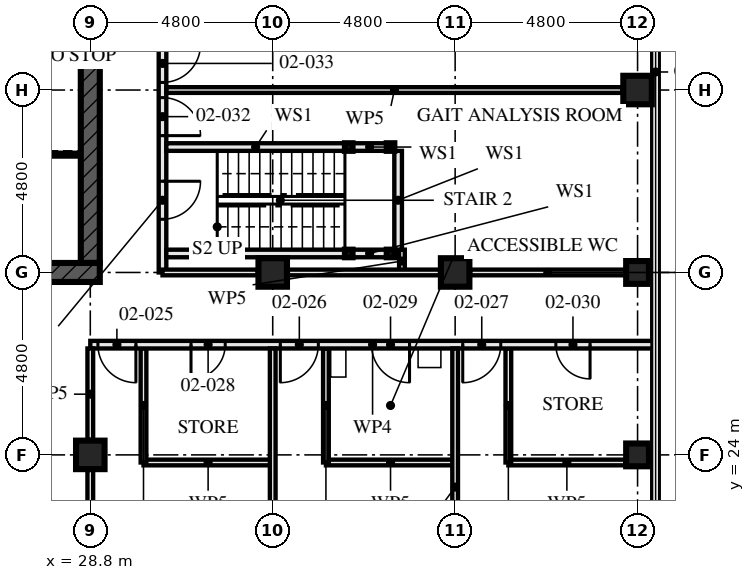
"""IFC4 building model, lengths in metres.
Left out: names, types, materials, properties, quantities, classifications, styles, units other than length and angle.
Written with IfcOpenShell. Run it as: python <this file> out.ifc"""

import sys

from ifc_helpers import new_model, si_unit, direction, frame, frame_2d, origin, origin_2d, place, context, subcontext, project, spatial, rectangle, hollow_rectangle, extrude, element, fill, save


model = new_model("IFC4")
c1 = context("Model", 3, precision=1e-05, world=origin(), true_north=direction((0.0, 1.0)))
c2 = subcontext(c1, "Body", "Model", "MODEL_VIEW")
j1 = project(units=[si_unit("LENGTHUNIT", "METRE"), si_unit("PLANEANGLEUNIT", "RADIAN")], contexts=[c1])
p1 = place(None, origin())
s1 = spatial("IfcSite", under=j1, at=p1, CompositionType="ELEMENT")
p2 = place(p1, origin())
s2 = spatial("IfcBuilding", under=s1, at=p2, CompositionType="ELEMENT")
p3 = place(p2, frame((0.0, 0.0, 9.0)))
s3 = spatial("IfcBuildingStorey", under=s2, at=p3, CompositionType="ELEMENT", Elevation=9.0)
for number, where, z_axis, x_axis in (
    (1, (28.8, 24.0, 0.0), (0.0, 0.0, 1.0), (1.0, 0.0, 0.0)),
    (2, (33.6, 28.8, 0.0), (0.0, 0.0, 1.0), (0.0, 1.0, 0.0)),
    (3, (38.4, 28.8, 0.0), (0.0, 0.0, 1.0), (0.0, 1.0, 0.0)),
):
    element("IfcColumn", number, at=place(p3, frame(where, z_axis=z_axis, x_axis=x_axis)), inside=s3, PredefinedType="COLUMN", context=c2, shape_type="SweptSolid", body=[
        extrude(hollow_rectangle(XDim=0.75, YDim=0.75, WallThickness=0.08, at=origin_2d()), origin(), (0.0, 0.0, 1.0), 4.5),
    ])
for number, where, z_axis, x_axis in (
    (4, (43.2, 24.0, 0.0), (0.0, 0.0, 1.0), (1.0, 0.0, 0.0)),
    (5, (43.2, 28.8, 0.0), (0.0, 0.0, 1.0), (0.0, 1.0, 0.0)),
):
    element("IfcColumn", number, at=place(p3, frame(where, z_axis=z_axis, x_axis=x_axis)), inside=s3, PredefinedType="COLUMN", context=c2, shape_type="SweptSolid", body=[
        extrude(hollow_rectangle(XDim=0.6, YDim=0.6, WallThickness=0.08, at=origin_2d()), origin(), (0.0, 0.0, 1.0), 4.5),
    ])
p4 = place(p3, frame((43.2, 33.6, 0.0), z_axis=(0.0, 0.0, 1.0), x_axis=(1.0, 0.0, 0.0)))
e6 = element("IfcColumn", 6, at=p4, inside=s3, PredefinedType="COLUMN", context=c2, shape_type="SweptSolid", body=[
    extrude(hollow_rectangle(XDim=0.75, YDim=0.75, WallThickness=0.08, at=origin_2d()), origin(), (0.0, 0.0, 1.0), 4.5),
])
p5 = place(p3, frame((14.15, 28.8, -0.17), z_axis=(0.0, 0.0, 1.0), x_axis=(1.0, 0.0, 0.0)))
e7 = element("IfcWall", 7, at=p5, inside=s3, PredefinedType="SHEAR", context=c2, shape_type="SweptSolid", body=[
    extrude(rectangle(XDim=14.9, YDim=0.5, at=frame_2d((7.45, 0.0))), origin(), (0.0, 0.0, 1.0), 4.5),
])
p6 = place(p5, frame((6.85, 0.0, 0.17)))
e8 = element("IfcOpeningElement", 8, at=p6, cuts=e7, PredefinedType="OPENING", context=c2, shape_type="SweptSolid", body=[
    extrude(rectangle(XDim=1.2, YDim=2.1, at=frame_2d((0.6, 1.05))), frame((0.0, 0.26, 0.0), z_axis=(0.0, -1.0, 0.0), x_axis=(1.0, 0.0, 0.0)), (0.0, 0.0, 1.0), 0.521),
])
p7 = place(p3, frame((28.8, 29.05, -0.17), z_axis=(0.0, 0.0, 1.0), x_axis=(0.0, 1.0, 0.0)))
e9 = element("IfcWall", 9, at=p7, inside=s3, PredefinedType="SHEAR", context=c2, shape_type="SweptSolid", body=[
    extrude(rectangle(XDim=13.9, YDim=0.5, at=frame_2d((6.95, 0.0))), origin(), (0.0, 0.0, 1.0), 4.5),
])
p8 = place(p7, frame((6.35, 0.0, 0.17)))
e10 = element("IfcOpeningElement", 10, at=p8, cuts=e9, PredefinedType="OPENING", context=c2, shape_type="SweptSolid", body=[
    extrude(rectangle(XDim=1.2, YDim=2.1, at=frame_2d((0.6, 1.05))), frame((0.0, 0.26, 0.0), z_axis=(0.0, -1.0, 0.0), x_axis=(1.0, 0.0, 0.0)), (0.0, 0.0, 1.0), 0.521),
])
for number, where, z_axis, x_axis in (
    (11, (36.7, 29.3, 0.0), (0.0, 0.0, 1.0), (1.0, 0.0, 0.0)),
    (12, (36.7, 32.1, 0.0), (0.0, 0.0, 1.0), (1.0, 0.0, 0.0)),
    (13, (35.6, 29.3, 0.0), (0.0, 0.0, 1.0), (1.0, 0.0, 0.0)),
    (14, (35.6, 32.1, 0.0), (0.0, 0.0, 1.0), (1.0, 0.0, 0.0)),
):
    element("IfcColumn", number, at=place(p3, frame(where, z_axis=z_axis, x_axis=x_axis)), inside=s3, PredefinedType="COLUMN", context=c2, shape_type="SweptSolid", body=[
        extrude(hollow_rectangle(XDim=0.2, YDim=0.2, WallThickness=0.008, at=origin_2d()), origin(), (0.0, 0.0, 1.0), 4.33),
    ])
p9 = place(p3, frame((30.2, 23.8, 0.0), z_axis=(0.0, 0.0, 1.0), x_axis=(0.0, 1.0, 0.0)))
e15 = element("IfcWall", 15, at=p9, inside=s3, PredefinedType="PARTITIONING", context=c2, shape_type="SweptSolid", body=[
    extrude(rectangle(XDim=3.0, YDim=0.15, at=frame_2d((1.5, 0.0))), origin(), (0.0, 0.0, 1.0), 3.55),
])
p10 = place(p3, frame((30.2, 23.8, 0.0), z_axis=(0.0, 0.0, 1.0), x_axis=(1.0, 0.0, 0.0)))
e16 = element("IfcWall", 16, at=p10, inside=s3, PredefinedType="PARTITIONING", context=c2, shape_type="SweptSolid", body=[
    extrude(rectangle(XDim=3.4, YDim=0.15, at=frame_2d((1.7, 0.0))), origin(), (0.0, 0.0, 1.0), 4.33),
])
p11 = place(p3, frame((35.0, 23.8, 0.0), z_axis=(0.0, 0.0, 1.0), x_axis=(0.0, 1.0, 0.0)))
e17 = element("IfcWall", 17, at=p11, inside=s3, PredefinedType="PARTITIONING", context=c2, shape_type="SweptSolid", body=[
    extrude(rectangle(XDim=3.0, YDim=0.15, at=frame_2d((1.5, 0.0))), origin(), (0.0, 0.0, 1.0), 3.55),
])
p12 = place(p3, frame((35.0, 23.8, 0.0), z_axis=(0.0, 0.0, 1.0), x_axis=(1.0, 0.0, 0.0)))
e18 = element("IfcWall", 18, at=p12, inside=s3, PredefinedType="PARTITIONING", context=c2, shape_type="SweptSolid", body=[
    extrude(rectangle(XDim=3.4, YDim=0.15, at=frame_2d((1.7, 0.0))), origin(), (0.0, 0.0, 1.0), 4.33),
])
p13 = place(p3, frame((39.8, 23.8, 0.0), z_axis=(0.0, 0.0, 1.0), x_axis=(0.0, 1.0, 0.0)))
e19 = element("IfcWall", 19, at=p13, inside=s3, PredefinedType="PARTITIONING", context=c2, shape_type="SweptSolid", body=[
    extrude(rectangle(XDim=3.0, YDim=0.15, at=frame_2d((1.5, 0.0))), origin(), (0.0, 0.0, 1.0), 3.55),
])
p14 = place(p3, frame((39.8, 23.8, 0.0), z_axis=(0.0, 0.0, 1.0), x_axis=(1.0, 0.0, 0.0)))
e20 = element("IfcWall", 20, at=p14, inside=s3, PredefinedType="PARTITIONING", context=c2, shape_type="SweptSolid", body=[
    extrude(rectangle(XDim=3.08, YDim=0.15, at=frame_2d((1.54, 0.0))), origin(), (0.0, 0.0, 1.0), 4.33),
])
p15 = place(p3, frame((33.6, 14.705, 0.0), z_axis=(0.0, 0.0, 1.0), x_axis=(0.0, 1.0, 0.0)))
e21 = element("IfcWall", 21, at=p15, inside=s3, PredefinedType="PARTITIONING", context=c2, shape_type="SweptSolid", body=[
    extrude(rectangle(XDim=12.095, YDim=0.15, at=frame_2d((6.048, 0.0))), origin(), (0.0, 0.0, 1.0), 3.55),
])
p16 = place(p3, frame((38.4, 19.504, 0.0), z_axis=(0.0, 0.0, 1.0), x_axis=(0.0, 1.0, 0.0)))
e22 = element("IfcWall", 22, at=p16, inside=s3, PredefinedType="PARTITIONING", context=c2, shape_type="SweptSolid", body=[
    extrude(rectangle(XDim=7.296, YDim=0.15, at=frame_2d((3.648, 0.0))), origin(), (0.0, 0.0, 1.0), 3.55),
])
p17 = place(p3, frame((28.8, 26.9, 0.0), z_axis=(0.0, 0.0, 1.0), x_axis=(1.0, 0.0, 0.0)))
e23 = element("IfcWall", 23, at=p17, inside=s3, PredefinedType="PARTITIONING", context=c2, shape_type="SweptSolid", body=[
    extrude(rectangle(XDim=14.855, YDim=0.2, at=frame_2d((7.427, 0.0))), origin(), (0.0, 0.0, 1.0), 3.32),
])
p18 = place(p17, frame((0.2, 0.0, 0.0)))
e24 = element("IfcOpeningElement", 24, at=p18, cuts=e23, PredefinedType="OPENING", context=c2, shape_type="SweptSolid", body=[
    extrude(rectangle(XDim=1.0, YDim=2.4, at=frame_2d((0.5, 1.2))), frame((0.0, 0.111, 0.0), z_axis=(0.0, -1.0, 0.0), x_axis=(1.0, 0.0, 0.0)), (0.0, 0.0, 1.0), 0.221),
])
p19 = place(p17, frame((5.0, 0.0, 0.0)))
e25 = element("IfcOpeningElement", 25, at=p19, cuts=e23, PredefinedType="OPENING", context=c2, shape_type="SweptSolid", body=[
    extrude(rectangle(XDim=1.0, YDim=2.4, at=frame_2d((0.5, 1.2))), frame((0.0, 0.111, 0.0), z_axis=(0.0, -1.0, 0.0), x_axis=(1.0, 0.0, 0.0)), (0.0, 0.0, 1.0), 0.221),
])
p20 = place(p17, frame((9.8, 0.0, 0.0)))
e26 = element("IfcOpeningElement", 26, at=p20, cuts=e23, PredefinedType="OPENING", context=c2, shape_type="SweptSolid", body=[
    extrude(rectangle(XDim=1.0, YDim=2.4, at=frame_2d((0.5, 1.2))), frame((0.0, 0.111, 0.0), z_axis=(0.0, -1.0, 0.0), x_axis=(1.0, 0.0, 0.0)), (0.0, 0.0, 1.0), 0.221),
])
p21 = place(p17, frame((2.65, 0.0, 0.0)))
e27 = element("IfcOpeningElement", 27, at=p21, cuts=e23, PredefinedType="OPENING", context=c2, shape_type="SweptSolid", body=[
    extrude(rectangle(XDim=0.9, YDim=2.1, at=frame_2d((0.45, 1.05))), frame((0.0, 0.111, 0.0), z_axis=(0.0, -1.0, 0.0), x_axis=(1.0, 0.0, 0.0)), (0.0, 0.0, 1.0), 0.221),
])
p22 = place(p17, frame((7.4, 0.0, 0.0)))
e28 = element("IfcOpeningElement", 28, at=p22, cuts=e23, PredefinedType="OPENING", context=c2, shape_type="SweptSolid", body=[
    extrude(rectangle(XDim=1.0, YDim=2.1, at=frame_2d((0.5, 1.05))), frame((0.0, 0.111, 0.0), z_axis=(0.0, -1.0, 0.0), x_axis=(1.0, 0.0, 0.0)), (0.0, 0.0, 1.0), 0.221),
])
p23 = place(p17, frame((12.25, 0.0, 0.0)))
e29 = element("IfcOpeningElement", 29, at=p23, cuts=e23, PredefinedType="OPENING", context=c2, shape_type="SweptSolid", body=[
    extrude(rectangle(XDim=0.9, YDim=2.1, at=frame_2d((0.45, 1.05))), frame((0.0, 0.111, 0.0), z_axis=(0.0, -1.0, 0.0), x_axis=(1.0, 0.0, 0.0)), (0.0, 0.0, 1.0), 0.221),
])
p24 = place(p3, frame((36.6, 29.3, 0.0), z_axis=(0.0, 0.0, 1.0), x_axis=(-1.0, 0.0, 0.0)))
e30 = element("IfcWall", 30, at=p24, inside=s3, PredefinedType="SOLIDWALL", context=c2, shape_type="SweptSolid", body=[
    extrude(rectangle(XDim=0.9, YDim=0.2, at=frame_2d((0.45, 0.0))), origin(), (0.0, 0.0, 1.0), 3.99),
])
p25 = place(p3, frame((35.5, 29.3, 0.0), z_axis=(0.0, 0.0, 1.0), x_axis=(-1.0, 0.0, 0.0)))
e31 = element("IfcWall", 31, at=p25, inside=s3, PredefinedType="SOLIDWALL", context=c2, shape_type="SweptSolid", body=[
    extrude(rectangle(XDim=4.7, YDim=0.2, at=frame_2d((2.35, 0.0))), origin(), (0.0, 0.0, 1.0), 3.99),
])
p26 = place(p3, frame((36.6, 32.1, 0.0), z_axis=(0.0, 0.0, 1.0), x_axis=(-1.0, 0.0, 0.0)))
e32 = element("IfcWall", 32, at=p26, inside=s3, PredefinedType="SOLIDWALL", context=c2, shape_type="SweptSolid", body=[
    extrude(rectangle(XDim=0.9, YDim=0.2, at=frame_2d((0.45, 0.0))), origin(), (0.0, 0.0, 1.0), 3.99),
])
p27 = place(p3, frame((35.5, 32.1, 0.0), z_axis=(0.0, 0.0, 1.0), x_axis=(-1.0, 0.0, 0.0)))
e33 = element("IfcWall", 33, at=p27, inside=s3, PredefinedType="SOLIDWALL", context=c2, shape_type="SweptSolid", body=[
    extrude(rectangle(XDim=4.7, YDim=0.2, at=frame_2d((2.35, 0.0))), origin(), (0.0, 0.0, 1.0), 3.99),
])
p28 = place(p3, frame((36.9, 29.4, 0.0), z_axis=(0.0, 0.0, 1.0), x_axis=(0.0, 1.0, 0.0)))
e34 = element("IfcWall", 34, at=p28, inside=s3, PredefinedType="SOLIDWALL", context=c2, shape_type="SweptSolid", body=[
    extrude(rectangle(XDim=2.6, YDim=0.2, at=frame_2d((1.3, 0.0))), origin(), (0.0, 0.0, 1.0), 4.33),
])
p29 = place(p3, frame((42.805, 33.6, 0.0), z_axis=(0.0, 0.0, 1.0), x_axis=(-1.0, 0.0, 0.0)))
e35 = element("IfcWall", 35, at=p29, inside=s3, PredefinedType="PARTITIONING", context=c2, shape_type="SweptSolid", body=[
    extrude(rectangle(XDim=12.005, YDim=0.15, at=frame_2d((6.002, 0.0))), origin(), (0.0, 0.0, 1.0), 3.55),
])
p30 = place(p3, frame((37.0, 28.8, 0.0), z_axis=(0.0, 0.0, 1.0), x_axis=(0.0, 1.0, 0.0)))
e36 = element("IfcWall", 36, at=p30, inside=s3, PredefinedType="PARTITIONING", context=c2, shape_type="SweptSolid", body=[
    extrude(rectangle(XDim=0.6, YDim=0.15, at=frame_2d((0.3, 0.0))), origin(), (0.0, 0.0, 1.0), 4.33),
])
p31 = place(p3, frame((30.7, 28.8, 0.0), z_axis=(0.0, 0.0, 1.0), x_axis=(0.0, 1.0, 0.0)))
e37 = element("IfcWall", 37, at=p31, inside=s3, PredefinedType="PARTITIONING", context=c2, shape_type="SweptSolid", body=[
    extrude(rectangle(XDim=14.4, YDim=0.2, at=frame_2d((7.2, 0.0))), origin(), (0.0, 0.0, 1.0), 3.55),
])
p32 = place(p31, frame((1.4, 0.0, 0.0)))
e38 = element("IfcOpeningElement", 38, at=p32, cuts=e37, PredefinedType="OPENING", context=c2, shape_type="SweptSolid", body=[
    extrude(rectangle(XDim=1.0, YDim=2.1, at=frame_2d((0.5, 1.05))), frame((0.0, 0.111, 0.0), z_axis=(0.0, -1.0, 0.0), x_axis=(1.0, 0.0, 0.0)), (0.0, 0.0, 1.0), 0.221),
])
p33 = place(p31, frame((3.6, 0.0, 0.0)))
e39 = element("IfcOpeningElement", 39, at=p33, cuts=e37, PredefinedType="OPENING", context=c2, shape_type="SweptSolid", body=[
    extrude(rectangle(XDim=1.0, YDim=2.4, at=frame_2d((0.5, 1.2))), frame((0.0, 0.111, 0.0), z_axis=(0.0, -1.0, 0.0), x_axis=(1.0, 0.0, 0.0)), (0.0, 0.0, 1.0), 0.221),
])
p34 = place(p31, frame((5.0, 0.0, 0.0)))
e40 = element("IfcOpeningElement", 40, at=p34, cuts=e37, PredefinedType="OPENING", context=c2, shape_type="SweptSolid", body=[
    extrude(rectangle(XDim=1.0, YDim=2.4, at=frame_2d((0.5, 1.2))), frame((0.0, 0.111, 0.0), z_axis=(0.0, -1.0, 0.0), x_axis=(1.0, 0.0, 0.0)), (0.0, 0.0, 1.0), 0.221),
])
p35 = place(p31, frame((9.8, 0.0, 0.0)))
e41 = element("IfcOpeningElement", 41, at=p35, cuts=e37, PredefinedType="OPENING", context=c2, shape_type="SweptSolid", body=[
    extrude(rectangle(XDim=1.0, YDim=2.4, at=frame_2d((0.5, 1.2))), frame((0.0, 0.111, 0.0), z_axis=(0.0, -1.0, 0.0), x_axis=(1.0, 0.0, 0.0)), (0.0, 0.0, 1.0), 0.221),
])
p36 = place(p31, frame((7.45, 0.0, 0.0)))
e42 = element("IfcOpeningElement", 42, at=p36, cuts=e37, PredefinedType="OPENING", context=c2, shape_type="SweptSolid", body=[
    extrude(rectangle(XDim=0.9, YDim=2.1, at=frame_2d((0.45, 1.05))), frame((0.0, 0.111, 0.0), z_axis=(0.0, -1.0, 0.0), x_axis=(1.0, 0.0, 0.0)), (0.0, 0.0, 1.0), 0.221),
])
p37 = place(p31, frame((12.2, 0.0, 0.0)))
e43 = element("IfcOpeningElement", 43, at=p37, cuts=e37, PredefinedType="OPENING", context=c2, shape_type="SweptSolid", body=[
    extrude(rectangle(XDim=1.0, YDim=2.1, at=frame_2d((0.5, 1.05))), frame((0.0, 0.111, 0.0), z_axis=(0.0, -1.0, 0.0), x_axis=(1.0, 0.0, 0.0)), (0.0, 0.0, 1.0), 0.221),
])
p38 = place(p3, frame((23.15, 31.9, 0.0), z_axis=(0.0, 0.0, 1.0), x_axis=(1.0, 0.0, 0.0)))
e44 = element("IfcWall", 44, at=p38, inside=s3, PredefinedType="SOLIDWALL", context=c2, shape_type="SweptSolid", body=[
    extrude(rectangle(XDim=5.4, YDim=0.1, at=frame_2d((2.7, 0.0))), origin(), (0.0, 0.0, 1.0), 4.33),
])
p39 = place(p3, frame((28.8, 19.595, 0.0), z_axis=(0.0, 0.0, 1.0), x_axis=(0.0, 1.0, 0.0)))
e45 = element("IfcWall", 45, at=p39, inside=s3, PredefinedType="PARTITIONING", context=c2, shape_type="SweptSolid", body=[
    extrude(rectangle(XDim=4.01, YDim=0.15, at=frame_2d((2.005, 0.0))), origin(), (0.0, 0.0, 1.0), 3.32),
])
p40 = place(p3, frame((28.8, 24.395, 0.0), z_axis=(0.0, 0.0, 1.0), x_axis=(0.0, 1.0, 0.0)))
e46 = element("IfcWall", 46, at=p40, inside=s3, PredefinedType="PARTITIONING", context=c2, shape_type="SweptSolid", body=[
    extrude(rectangle(XDim=2.405, YDim=0.15, at=frame_2d((1.203, 0.0))), origin(), (0.0, 0.0, 1.0), 3.32),
])
p41 = place(p3, frame((42.88, 28.8, 0.0), z_axis=(0.0, 0.0, 1.0), x_axis=(-1.0, 0.0, 0.0)))
e47 = element("IfcWall", 47, at=p41, inside=s3, PredefinedType="PARTITIONING", context=c2, shape_type="SweptSolid", body=[
    extrude(rectangle(XDim=4.085, YDim=0.15, at=frame_2d((2.042, 0.0))), origin(), (0.0, 0.0, 1.0), 3.32),
])
p42 = place(p3, frame((38.005, 28.8, 0.0), z_axis=(0.0, 0.0, 1.0), x_axis=(-1.0, 0.0, 0.0)))
e48 = element("IfcWall", 48, at=p42, inside=s3, PredefinedType="PARTITIONING", context=c2, shape_type="SweptSolid", body=[
    extrude(rectangle(XDim=4.01, YDim=0.15, at=frame_2d((2.005, 0.0))), origin(), (0.0, 0.0, 1.0), 3.32),
])
p43 = place(p3, frame((33.205, 28.8, 0.0), z_axis=(0.0, 0.0, 1.0), x_axis=(-1.0, 0.0, 0.0)))
e49 = element("IfcWall", 49, at=p43, inside=s3, PredefinedType="PARTITIONING", context=c2, shape_type="SweptSolid", body=[
    extrude(rectangle(XDim=2.505, YDim=0.15, at=frame_2d((1.252, 0.0))), origin(), (0.0, 0.0, 1.0), 3.32),
])
p44 = place(p18, frame((1.0, 0.0, 0.0), z_axis=(0.0, 0.0, 1.0), x_axis=(-1.0, 0.0, 0.0)))
e50 = element("IfcDoor", 50, at=p44, inside=s3, OperationType="SINGLE_SWING_RIGHT", PredefinedType="DOOR", context=c2, shape_type="SweptSolid", body=[
    extrude(rectangle(XDim=1.0, YDim=2.4, at=frame_2d((0.5, 1.2))), frame((0.0, 0.027, 0.0), z_axis=(0.0, -1.0, 0.0), x_axis=(1.0, 0.0, 0.0)), (0.0, 0.0, 1.0), 0.054),
])
fill(e24, e50)
p45 = place(p19, frame((1.0, 0.0, 0.0), z_axis=(0.0, 0.0, 1.0), x_axis=(-1.0, 0.0, 0.0)))
e51 = element("IfcDoor", 51, at=p45, inside=s3, OperationType="SINGLE_SWING_LEFT", PredefinedType="DOOR", context=c2, shape_type="SweptSolid", body=[
    extrude(rectangle(XDim=1.0, YDim=2.4, at=frame_2d((0.5, 1.2))), frame((0.0, 0.027, 0.0), z_axis=(0.0, -1.0, 0.0), x_axis=(1.0, 0.0, 0.0)), (0.0, 0.0, 1.0), 0.054),
])
fill(e25, e51)
p46 = place(p20, frame((1.0, 0.0, 0.0), z_axis=(0.0, 0.0, 1.0), x_axis=(-1.0, 0.0, 0.0)))
e52 = element("IfcDoor", 52, at=p46, inside=s3, OperationType="SINGLE_SWING_LEFT", PredefinedType="DOOR", context=c2, shape_type="SweptSolid", body=[
    extrude(rectangle(XDim=1.0, YDim=2.4, at=frame_2d((0.5, 1.2))), frame((0.0, 0.027, 0.0), z_axis=(0.0, -1.0, 0.0), x_axis=(1.0, 0.0, 0.0)), (0.0, 0.0, 1.0), 0.054),
])
fill(e26, e52)
p47 = place(p21, frame((0.9, 0.0, 0.0), z_axis=(0.0, 0.0, 1.0), x_axis=(-1.0, 0.0, 0.0)))
e53 = element("IfcDoor", 53, at=p47, inside=s3, OperationType="SINGLE_SWING_LEFT", PredefinedType="DOOR", context=c2, shape_type="SweptSolid", body=[
    extrude(rectangle(XDim=0.9, YDim=2.1, at=frame_2d((0.45, 1.05))), frame((0.0, 0.027, 0.0), z_axis=(0.0, -1.0, 0.0), x_axis=(1.0, 0.0, 0.0)), (0.0, 0.0, 1.0), 0.054),
])
fill(e27, e53)
p48 = place(p22, frame((1.0, 0.0, 0.0), z_axis=(0.0, 0.0, 1.0), x_axis=(-1.0, 0.0, 0.0)))
e54 = element("IfcDoor", 54, at=p48, inside=s3, OperationType="SINGLE_SWING_RIGHT", PredefinedType="DOOR", context=c2, shape_type="SweptSolid", body=[
    extrude(rectangle(XDim=1.0, YDim=2.1, at=frame_2d((0.5, 1.05))), frame((0.0, 0.027, 0.0), z_axis=(0.0, -1.0, 0.0), x_axis=(1.0, 0.0, 0.0)), (0.0, 0.0, 1.0), 0.054),
])
fill(e28, e54)
p49 = place(p23, frame((0.9, 0.0, 0.0), z_axis=(0.0, 0.0, 1.0), x_axis=(-1.0, 0.0, 0.0)))
e55 = element("IfcDoor", 55, at=p49, inside=s3, OperationType="SINGLE_SWING_RIGHT", PredefinedType="DOOR", context=c2, shape_type="SweptSolid", body=[
    extrude(rectangle(XDim=0.9, YDim=2.1, at=frame_2d((0.45, 1.05))), frame((0.0, 0.027, 0.0), z_axis=(0.0, -1.0, 0.0), x_axis=(1.0, 0.0, 0.0)), (0.0, 0.0, 1.0), 0.054),
])
fill(e29, e55)
p50 = place(p32, frame((1.0, 0.0, 0.0), z_axis=(0.0, 0.0, 1.0), x_axis=(-1.0, 0.0, 0.0)))
e56 = element("IfcDoor", 56, at=p50, inside=s3, OperationType="SINGLE_SWING_RIGHT", PredefinedType="DOOR", context=c2, shape_type="SweptSolid", body=[
    extrude(rectangle(XDim=1.0, YDim=2.1, at=frame_2d((0.5, 1.05))), frame((0.0, 0.032, 0.0), z_axis=(0.0, -1.0, 0.0), x_axis=(1.0, 0.0, 0.0)), (0.0, 0.0, 1.0), 0.064),
])
fill(e38, e56)
p51 = place(p33, frame((1.0, 0.0, 0.0), z_axis=(0.0, 0.0, 1.0), x_axis=(-1.0, 0.0, 0.0)))
e57 = element("IfcDoor", 57, at=p51, inside=s3, OperationType="SINGLE_SWING_LEFT", PredefinedType="DOOR", context=c2, shape_type="SweptSolid", body=[
    extrude(rectangle(XDim=1.0, YDim=2.4, at=frame_2d((0.5, 1.2))), frame((0.0, 0.027, 0.0), z_axis=(0.0, -1.0, 0.0), x_axis=(1.0, 0.0, 0.0)), (0.0, 0.0, 1.0), 0.054),
])
fill(e39, e57)
p52 = place(p34, frame((1.0, 0.0, 0.0), z_axis=(0.0, 0.0, 1.0), x_axis=(-1.0, 0.0, 0.0)))
e58 = element("IfcDoor", 58, at=p52, inside=s3, OperationType="SINGLE_SWING_RIGHT", PredefinedType="DOOR", context=c2, shape_type="SweptSolid", body=[
    extrude(rectangle(XDim=1.0, YDim=2.4, at=frame_2d((0.5, 1.2))), frame((0.0, 0.027, 0.0), z_axis=(0.0, -1.0, 0.0), x_axis=(1.0, 0.0, 0.0)), (0.0, 0.0, 1.0), 0.054),
])
fill(e40, e58)
save(model, sys.argv[1])
